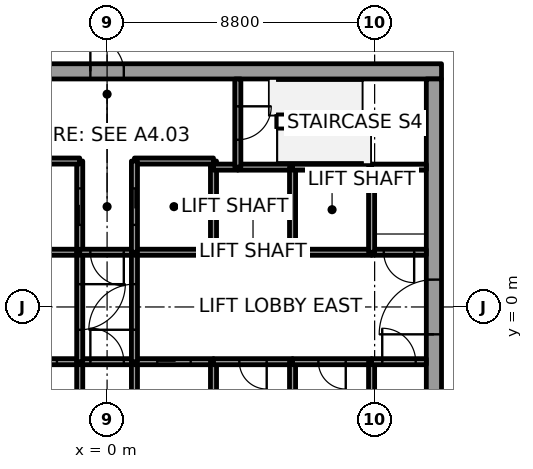
"""IFC4 building model, lengths in metres.
Left out: names, types, materials, properties, quantities, classifications, styles, units other than length and angle.
Written with IfcOpenShell. Run it as: python <this file> out.ifc"""

import sys

from ifc_helpers import new_model, si_unit, direction, frame, frame_2d, origin, place, context, subcontext, project, spatial, rectangle, extrude, element, fill, save


model = new_model("IFC4")
c1 = context("Model", 3, precision=1e-05, world=origin(), true_north=direction((0.0, 1.0)))
c2 = subcontext(c1, "Body", "Model", "MODEL_VIEW")
j1 = project(units=[si_unit("LENGTHUNIT", "METRE"), si_unit("PLANEANGLEUNIT", "RADIAN")], contexts=[c1])
p1 = place(None, origin())
s1 = spatial("IfcSite", under=j1, at=p1, CompositionType="ELEMENT")
p2 = place(p1, origin())
s2 = spatial("IfcBuilding", under=s1, at=p2, CompositionType="ELEMENT")
p3 = place(p2, frame((0.0, 0.0, 9.0)))
s3 = spatial("IfcBuildingStorey", under=s2, at=p3, CompositionType="ELEMENT", Elevation=9.0)
p4 = place(p3, frame((-11.0, 7.75, 0.0), z_axis=(0.0, 0.0, 1.0), x_axis=(1.0, 0.0, 0.0)))
e1 = element("IfcWall", 1, at=p4, inside=s3, PredefinedType="SHEAR", context=c2, shape_type="SweptSolid", body=[
    extrude(rectangle(XDim=22.0, YDim=0.5, at=frame_2d((11.0, 0.0))), origin(), (0.0, 0.0, 1.0), 7.8),
])
p5 = place(p4, frame((10.45, 0.0, 0.0)))
e2 = element("IfcOpeningElement", 2, at=p5, cuts=e1, PredefinedType="OPENING", context=c2, shape_type="SweptSolid", body=[
    extrude(rectangle(XDim=1.1, YDim=2.1, at=frame_2d((0.55, 1.05))), frame((0.0, 0.25, 0.0), z_axis=(0.0, -1.0, 0.0), x_axis=(1.0, 0.0, 0.0)), (0.0, 0.0, 1.0), 0.5),
])
p6 = place(p3, frame((10.75, -7.5, 0.0), z_axis=(0.0, 0.0, 1.0), x_axis=(0.0, 1.0, 0.0)))
e3 = element("IfcWall", 3, at=p6, inside=s3, PredefinedType="SHEAR", context=c2, shape_type="SweptSolid", body=[
    extrude(rectangle(XDim=15.0, YDim=0.5, at=frame_2d((7.5, 0.0))), origin(), (0.0, 0.0, 1.0), 7.8),
])
p7 = place(p6, frame((6.6, 0.0, 0.0)))
e4 = element("IfcOpeningElement", 4, at=p7, cuts=e3, PredefinedType="OPENING", context=c2, shape_type="SweptSolid", body=[
    extrude(rectangle(XDim=1.8, YDim=2.1, at=frame_2d((0.9, 1.05))), frame((0.0, 0.25, 0.0), z_axis=(0.0, -1.0, 0.0), x_axis=(1.0, 0.0, 0.0)), (0.0, 0.0, 1.0), 0.5),
])
p8 = place(p3, frame((-3.5, -1.8, 0.0), z_axis=(0.0, 0.0, 1.0), x_axis=(1.0, 0.0, 0.0)))
e5 = element("IfcWall", 5, at=p8, inside=s3, PredefinedType="SOLIDWALL", context=c2, shape_type="SweptSolid", body=[
    extrude(rectangle(XDim=2.6, YDim=0.2, at=frame_2d((1.3, 0.0))), origin(), (0.0, 0.0, 1.0), 7.55),
])
p9 = place(p8, frame((0.75, 0.0, 0.0)))
e6 = element("IfcOpeningElement", 6, at=p9, cuts=e5, PredefinedType="OPENING", context=c2, shape_type="SweptSolid", body=[
    extrude(rectangle(XDim=1.1, YDim=2.1, at=frame_2d((0.55, 1.05))), frame((0.0, 0.1, 0.0), z_axis=(0.0, -1.0, 0.0), x_axis=(1.0, 0.0, 0.0)), (0.0, 0.0, 1.0), 0.2),
])
p10 = place(p3, frame((-0.9, 1.8, 0.0), z_axis=(0.0, 0.0, 1.0), x_axis=(-1.0, 0.0, 0.0)))
e7 = element("IfcWall", 7, at=p10, inside=s3, PredefinedType="SOLIDWALL", context=c2, shape_type="SweptSolid", body=[
    extrude(rectangle(XDim=2.6, YDim=0.2, at=frame_2d((1.3, 0.0))), origin(), (0.0, 0.0, 1.0), 7.55),
])
p11 = place(p3, frame((-0.9, 1.8, 0.0), z_axis=(0.0, 0.0, 1.0), x_axis=(0.0, 1.0, 0.0)))
e8 = element("IfcWall", 8, at=p11, inside=s3, PredefinedType="SOLIDWALL", context=c2, shape_type="SweptSolid", body=[
    extrude(rectangle(XDim=3.0, YDim=0.2, at=frame_2d((1.5, 0.0))), origin(), (0.0, 0.0, 1.0), 7.55),
])
p12 = place(p11, frame((0.9, 0.0, 0.0)))
e9 = element("IfcOpeningElement", 9, at=p12, cuts=e8, PredefinedType="OPENING", context=c2, shape_type="SweptSolid", body=[
    extrude(rectangle(XDim=1.2, YDim=2.1, at=frame_2d((0.6, 1.05))), frame((0.0, 0.1, 0.0), z_axis=(0.0, -1.0, 0.0), x_axis=(1.0, 0.0, 0.0)), (0.0, 0.0, 1.0), 0.2),
])
p13 = place(p3, frame((-0.9, 4.8, 0.0), z_axis=(0.0, 0.0, 1.0), x_axis=(-1.0, 0.0, 0.0)))
e10 = element("IfcWall", 10, at=p13, inside=s3, PredefinedType="SOLIDWALL", context=c2, shape_type="SweptSolid", body=[
    extrude(rectangle(XDim=2.6, YDim=0.2, at=frame_2d((1.3, 0.0))), origin(), (0.0, 0.0, 1.0), 7.55),
])
p14 = place(p3, frame((-0.9, -4.6, 0.0), z_axis=(0.0, 0.0, 1.0), x_axis=(0.0, 1.0, 0.0)))
e11 = element("IfcWall", 11, at=p14, inside=s3, PredefinedType="SOLIDWALL", context=c2, shape_type="SweptSolid", body=[
    extrude(rectangle(XDim=2.8, YDim=0.2, at=frame_2d((1.4, 0.0))), origin(), (0.0, 0.0, 1.0), 7.55),
])
p15 = place(p3, frame((-0.9, -1.8, 0.0), z_axis=(0.0, 0.0, 1.0), x_axis=(1.0, 0.0, 0.0)))
e12 = element("IfcWall", 12, at=p15, inside=s3, PredefinedType="SOLIDWALL", context=c2, shape_type="SweptSolid", body=[
    extrude(rectangle(XDim=1.8, YDim=0.2, at=frame_2d((0.9, 0.0))), origin(), (0.0, 0.0, 1.0), 7.55),
])
p16 = place(p15, frame((0.35, 0.0, 0.0)))
e13 = element("IfcOpeningElement", 13, at=p16, cuts=e12, PredefinedType="OPENING", context=c2, shape_type="SweptSolid", body=[
    extrude(rectangle(XDim=1.1, YDim=2.4, at=frame_2d((0.55, 1.2))), frame((0.0, 0.1, 0.0), z_axis=(0.0, -1.0, 0.0), x_axis=(1.0, 0.0, 0.0)), (0.0, 0.0, 1.0), 0.2),
])
p17 = place(p3, frame((-0.9, 1.8, 0.0), z_axis=(0.0, 0.0, 1.0), x_axis=(0.0, -1.0, 0.0)))
e14 = element("IfcWall", 14, at=p17, inside=s3, PredefinedType="SOLIDWALL", context=c2, shape_type="SweptSolid", body=[
    extrude(rectangle(XDim=3.6, YDim=0.2, at=frame_2d((1.8, 0.0))), origin(), (0.0, 0.0, 1.0), 7.55),
])
p18 = place(p17, frame((1.05, 0.0, 0.0)))
e15 = element("IfcOpeningElement", 15, at=p18, cuts=e14, PredefinedType="OPENING", context=c2, shape_type="SweptSolid", body=[
    extrude(rectangle(XDim=1.5, YDim=2.4, at=frame_2d((0.75, 1.2))), frame((0.0, 0.1, 0.0), z_axis=(0.0, -1.0, 0.0), x_axis=(1.0, 0.0, 0.0)), (0.0, 0.0, 1.0), 0.2),
])
p19 = place(p3, frame((0.9, 1.8, 0.0), z_axis=(0.0, 0.0, 1.0), x_axis=(-1.0, 0.0, 0.0)))
e16 = element("IfcWall", 16, at=p19, inside=s3, PredefinedType="SOLIDWALL", context=c2, shape_type="SweptSolid", body=[
    extrude(rectangle(XDim=1.8, YDim=0.2, at=frame_2d((0.9, 0.0))), origin(), (0.0, 0.0, 1.0), 7.55),
])
p20 = place(p19, frame((0.35, 0.0, 0.0)))
e17 = element("IfcOpeningElement", 17, at=p20, cuts=e16, PredefinedType="OPENING", context=c2, shape_type="SweptSolid", body=[
    extrude(rectangle(XDim=1.1, YDim=2.4, at=frame_2d((0.55, 1.2))), frame((0.0, 0.1, 0.0), z_axis=(0.0, -1.0, 0.0), x_axis=(1.0, 0.0, 0.0)), (0.0, 0.0, 1.0), 0.2),
])
p21 = place(p3, frame((0.9, -1.8, 0.0), z_axis=(0.0, 0.0, 1.0), x_axis=(0.0, -1.0, 0.0)))
e18 = element("IfcWall", 18, at=p21, inside=s3, PredefinedType="SOLIDWALL", context=c2, shape_type="SweptSolid", body=[
    extrude(rectangle(XDim=2.8, YDim=0.2, at=frame_2d((1.4, 0.0))), origin(), (0.0, 0.0, 1.0), 7.55),
])
p22 = place(p3, frame((0.9, -1.8, 0.0), z_axis=(0.0, 0.0, 1.0), x_axis=(1.0, 0.0, 0.0)))
e19 = element("IfcWall", 19, at=p22, inside=s3, PredefinedType="SOLIDWALL", context=c2, shape_type="SweptSolid", body=[
    extrude(rectangle(XDim=2.6, YDim=0.2, at=frame_2d((1.3, 0.0))), origin(), (0.0, 0.0, 1.0), 7.55),
])
p23 = place(p22, frame((0.75, 0.0, 0.0)))
e20 = element("IfcOpeningElement", 20, at=p23, cuts=e19, PredefinedType="OPENING", context=c2, shape_type="SweptSolid", body=[
    extrude(rectangle(XDim=1.1, YDim=2.1, at=frame_2d((0.55, 1.05))), frame((0.0, 0.1, 0.0), z_axis=(0.0, -1.0, 0.0), x_axis=(1.0, 0.0, 0.0)), (0.0, 0.0, 1.0), 0.2),
])
p24 = place(p3, frame((0.9, -1.8, 0.0), z_axis=(0.0, 0.0, 1.0), x_axis=(0.0, 1.0, 0.0)))
e21 = element("IfcWall", 21, at=p24, inside=s3, PredefinedType="SOLIDWALL", context=c2, shape_type="SweptSolid", body=[
    extrude(rectangle(XDim=3.6, YDim=0.2, at=frame_2d((1.8, 0.0))), origin(), (0.0, 0.0, 1.0), 7.55),
])
p25 = place(p24, frame((1.05, 0.0, 0.0)))
e22 = element("IfcOpeningElement", 22, at=p25, cuts=e21, PredefinedType="OPENING", context=c2, shape_type="SweptSolid", body=[
    extrude(rectangle(XDim=1.5, YDim=2.4, at=frame_2d((0.75, 1.2))), frame((0.0, 0.1, 0.0), z_axis=(0.0, -1.0, 0.0), x_axis=(1.0, 0.0, 0.0)), (0.0, 0.0, 1.0), 0.2),
])
p26 = place(p3, frame((3.5, 1.8, 0.0), z_axis=(0.0, 0.0, 1.0), x_axis=(-1.0, 0.0, 0.0)))
e23 = element("IfcWall", 23, at=p26, inside=s3, PredefinedType="SOLIDWALL", context=c2, shape_type="SweptSolid", body=[
    extrude(rectangle(XDim=2.6, YDim=0.2, at=frame_2d((1.3, 0.0))), origin(), (0.0, 0.0, 1.0), 7.55),
])
p27 = place(p3, frame((3.5, 4.6, 0.0), z_axis=(0.0, 0.0, 1.0), x_axis=(0.0, 1.0, 0.0)))
e24 = element("IfcWall", 24, at=p27, inside=s3, PredefinedType="SOLIDWALL", context=c2, shape_type="SweptSolid", body=[
    extrude(rectangle(XDim=0.2, YDim=0.2, at=frame_2d((0.1, 0.0))), origin(), (0.0, 0.0, 1.0), 7.55),
])
p28 = place(p3, frame((3.5, 4.8, 0.0), z_axis=(0.0, 0.0, 1.0), x_axis=(-1.0, 0.0, 0.0)))
e25 = element("IfcWall", 25, at=p28, inside=s3, PredefinedType="SOLIDWALL", context=c2, shape_type="SweptSolid", body=[
    extrude(rectangle(XDim=2.6, YDim=0.2, at=frame_2d((1.3, 0.0))), origin(), (0.0, 0.0, 1.0), 7.55),
])
p29 = place(p3, frame((0.9, 4.8, 0.0), z_axis=(0.0, 0.0, 1.0), x_axis=(0.0, -1.0, 0.0)))
e26 = element("IfcWall", 26, at=p29, inside=s3, PredefinedType="SOLIDWALL", context=c2, shape_type="SweptSolid", body=[
    extrude(rectangle(XDim=3.0, YDim=0.2, at=frame_2d((1.5, 0.0))), origin(), (0.0, 0.0, 1.0), 7.55),
])
p30 = place(p29, frame((0.9, 0.0, 0.0)))
e27 = element("IfcOpeningElement", 27, at=p30, cuts=e26, PredefinedType="OPENING", context=c2, shape_type="SweptSolid", body=[
    extrude(rectangle(XDim=1.2, YDim=2.1, at=frame_2d((0.6, 1.05))), frame((0.0, 0.1, 0.0), z_axis=(0.0, -1.0, 0.0), x_axis=(1.0, 0.0, 0.0)), (0.0, 0.0, 1.0), 0.2),
])
p31 = place(p3, frame((3.5, -1.8, 0.0), z_axis=(0.0, 0.0, 1.0), x_axis=(0.0, -1.0, 0.0)))
e28 = element("IfcWall", 28, at=p31, inside=s3, PredefinedType="SOLIDWALL", context=c2, shape_type="SweptSolid", body=[
    extrude(rectangle(XDim=2.8, YDim=0.2, at=frame_2d((1.4, 0.0))), origin(), (0.0, 0.0, 1.0), 7.55),
])
p32 = place(p3, frame((6.1, -1.8, 0.0), z_axis=(0.0, 0.0, 1.0), x_axis=(-1.0, 0.0, 0.0)))
e29 = element("IfcWall", 29, at=p32, inside=s3, PredefinedType="SOLIDWALL", context=c2, shape_type="SweptSolid", body=[
    extrude(rectangle(XDim=2.6, YDim=0.2, at=frame_2d((1.3, 0.0))), origin(), (0.0, 0.0, 1.0), 7.55),
])
p33 = place(p32, frame((0.85, 0.0, 0.0)))
e30 = element("IfcOpeningElement", 30, at=p33, cuts=e29, PredefinedType="OPENING", context=c2, shape_type="SweptSolid", body=[
    extrude(rectangle(XDim=0.9, YDim=2.4, at=frame_2d((0.45, 1.2))), frame((0.0, 0.1, 0.0), z_axis=(0.0, -1.0, 0.0), x_axis=(1.0, 0.0, 0.0)), (0.0, 0.0, 1.0), 0.2),
])
p34 = place(p3, frame((6.1, 1.8, 0.0), z_axis=(0.0, 0.0, 1.0), x_axis=(-1.0, 0.0, 0.0)))
e31 = element("IfcWall", 31, at=p34, inside=s3, PredefinedType="SOLIDWALL", context=c2, shape_type="SweptSolid", body=[
    extrude(rectangle(XDim=2.6, YDim=0.2, at=frame_2d((1.3, 0.0))), origin(), (0.0, 0.0, 1.0), 7.55),
])
p35 = place(p3, frame((3.5, 1.8, 0.0), z_axis=(0.0, 0.0, 1.0), x_axis=(0.0, 1.0, 0.0)))
e32 = element("IfcWall", 32, at=p35, inside=s3, PredefinedType="SOLIDWALL", context=c2, shape_type="SweptSolid", body=[
    extrude(rectangle(XDim=2.8, YDim=0.2, at=frame_2d((1.4, 0.0))), origin(), (0.0, 0.0, 1.0), 7.55),
])
p36 = place(p3, frame((4.3, 4.6, 0.0), z_axis=(0.0, 0.0, 1.0), x_axis=(-1.0, 0.0, 0.0)))
e33 = element("IfcWall", 33, at=p36, inside=s3, PredefinedType="SOLIDWALL", context=c2, shape_type="SweptSolid", body=[
    extrude(rectangle(XDim=0.8, YDim=0.2, at=frame_2d((0.4, 0.0))), origin(), (0.0, 0.0, 1.0), 7.55),
])
p37 = place(p3, frame((6.1, 4.6, 0.0), z_axis=(0.0, 0.0, 1.0), x_axis=(-1.0, 0.0, 0.0)))
e34 = element("IfcWall", 34, at=p37, inside=s3, PredefinedType="SOLIDWALL", context=c2, shape_type="SweptSolid", body=[
    extrude(rectangle(XDim=1.8, YDim=0.2, at=frame_2d((0.9, 0.0))), origin(), (0.0, 0.0, 1.0), 7.55),
])
p38 = place(p3, frame((4.3, 7.5, 0.0), z_axis=(0.0, 0.0, 1.0), x_axis=(0.0, -1.0, 0.0)))
e35 = element("IfcWall", 35, at=p38, inside=s3, PredefinedType="SOLIDWALL", context=c2, shape_type="SweptSolid", body=[
    extrude(rectangle(XDim=2.9, YDim=0.2, at=frame_2d((1.45, 0.0))), origin(), (0.0, 0.0, 1.0), 7.55),
])
p39 = place(p38, frame((0.9, 0.0, 0.0)))
e36 = element("IfcOpeningElement", 36, at=p39, cuts=e35, PredefinedType="OPENING", context=c2, shape_type="SweptSolid", body=[
    extrude(rectangle(XDim=1.1, YDim=2.4, at=frame_2d((0.55, 1.2))), frame((0.0, 0.1, 0.0), z_axis=(0.0, -1.0, 0.0), x_axis=(1.0, 0.0, 0.0)), (0.0, 0.0, 1.0), 0.2),
])
p40 = place(p3, frame((6.1, -4.6, 0.0), z_axis=(0.0, 0.0, 1.0), x_axis=(0.0, 1.0, 0.0)))
e37 = element("IfcWall", 37, at=p40, inside=s3, PredefinedType="SOLIDWALL", context=c2, shape_type="SweptSolid", body=[
    extrude(rectangle(XDim=2.8, YDim=0.2, at=frame_2d((1.4, 0.0))), origin(), (0.0, 0.0, 1.0), 7.55),
])
p41 = place(p3, frame((8.7, -1.8, 0.0), z_axis=(0.0, 0.0, 1.0), x_axis=(-1.0, 0.0, 0.0)))
e38 = element("IfcWall", 38, at=p41, inside=s3, PredefinedType="SOLIDWALL", context=c2, shape_type="SweptSolid", body=[
    extrude(rectangle(XDim=2.6, YDim=0.2, at=frame_2d((1.3, 0.0))), origin(), (0.0, 0.0, 1.0), 7.55),
])
p42 = place(p41, frame((0.85, 0.0, 0.0)))
e39 = element("IfcOpeningElement", 39, at=p42, cuts=e38, PredefinedType="OPENING", context=c2, shape_type="SweptSolid", body=[
    extrude(rectangle(XDim=0.9, YDim=2.4, at=frame_2d((0.45, 1.2))), frame((0.0, 0.1, 0.0), z_axis=(0.0, -1.0, 0.0), x_axis=(1.0, 0.0, 0.0)), (0.0, 0.0, 1.0), 0.2),
])
p43 = place(p3, frame((8.7, 1.8, 0.0), z_axis=(0.0, 0.0, 1.0), x_axis=(-1.0, 0.0, 0.0)))
e40 = element("IfcWall", 40, at=p43, inside=s3, PredefinedType="SOLIDWALL", context=c2, shape_type="SweptSolid", body=[
    extrude(rectangle(XDim=2.6, YDim=0.2, at=frame_2d((1.3, 0.0))), origin(), (0.0, 0.0, 1.0), 7.55),
])
p44 = place(p3, frame((6.1, 1.8, 0.0), z_axis=(0.0, 0.0, 1.0), x_axis=(0.0, 1.0, 0.0)))
e41 = element("IfcWall", 41, at=p44, inside=s3, PredefinedType="SOLIDWALL", context=c2, shape_type="SweptSolid", body=[
    extrude(rectangle(XDim=2.8, YDim=0.2, at=frame_2d((1.4, 0.0))), origin(), (0.0, 0.0, 1.0), 7.55),
])
p45 = place(p3, frame((8.7, 4.6, 0.0), z_axis=(0.0, 0.0, 1.0), x_axis=(-1.0, 0.0, 0.0)))
e42 = element("IfcWall", 42, at=p45, inside=s3, PredefinedType="SOLIDWALL", context=c2, shape_type="SweptSolid", body=[
    extrude(rectangle(XDim=2.6, YDim=0.2, at=frame_2d((1.3, 0.0))), origin(), (0.0, 0.0, 1.0), 7.55),
])
p46 = place(p3, frame((8.7, -4.6, 0.0), z_axis=(0.0, 0.0, 1.0), x_axis=(0.0, 1.0, 0.0)))
e43 = element("IfcWall", 43, at=p46, inside=s3, PredefinedType="SOLIDWALL", context=c2, shape_type="SweptSolid", body=[
    extrude(rectangle(XDim=2.8, YDim=0.2, at=frame_2d((1.4, 0.0))), origin(), (0.0, 0.0, 1.0), 7.55),
])
p47 = place(p3, frame((8.7, -1.8, 0.0), z_axis=(0.0, 0.0, 1.0), x_axis=(1.0, 0.0, 0.0)))
e44 = element("IfcWall", 44, at=p47, inside=s3, PredefinedType="SOLIDWALL", context=c2, shape_type="SweptSolid", body=[
    extrude(rectangle(XDim=1.8, YDim=0.2, at=frame_2d((0.9, 0.0))), origin(), (0.0, 0.0, 1.0), 7.55),
])
p48 = place(p47, frame((0.35, 0.0, 0.0)))
e45 = element("IfcOpeningElement", 45, at=p48, cuts=e44, PredefinedType="OPENING", context=c2, shape_type="SweptSolid", body=[
    extrude(rectangle(XDim=1.1, YDim=2.4, at=frame_2d((0.55, 1.2))), frame((0.0, 0.1, 0.0), z_axis=(0.0, -1.0, 0.0), x_axis=(1.0, 0.0, 0.0)), (0.0, 0.0, 1.0), 0.2),
])
p49 = place(p3, frame((10.5, 1.8, 0.0), z_axis=(0.0, 0.0, 1.0), x_axis=(-1.0, 0.0, 0.0)))
e46 = element("IfcWall", 46, at=p49, inside=s3, PredefinedType="SOLIDWALL", context=c2, shape_type="SweptSolid", body=[
    extrude(rectangle(XDim=1.8, YDim=0.2, at=frame_2d((0.9, 0.0))), origin(), (0.0, 0.0, 1.0), 7.55),
])
p50 = place(p49, frame((0.4, 0.0, 0.0)))
e47 = element("IfcOpeningElement", 47, at=p50, cuts=e46, PredefinedType="OPENING", context=c2, shape_type="SweptSolid", body=[
    extrude(rectangle(XDim=1.0, YDim=2.4, at=frame_2d((0.5, 1.2))), frame((0.0, 0.1, 0.0), z_axis=(0.0, -1.0, 0.0), x_axis=(1.0, 0.0, 0.0)), (0.0, 0.0, 1.0), 0.2),
])
p51 = place(p3, frame((8.7, 4.6, 0.0), z_axis=(0.0, 0.0, 1.0), x_axis=(0.0, -1.0, 0.0)))
e48 = element("IfcWall", 48, at=p51, inside=s3, PredefinedType="SOLIDWALL", context=c2, shape_type="SweptSolid", body=[
    extrude(rectangle(XDim=2.8, YDim=0.2, at=frame_2d((1.4, 0.0))), origin(), (0.0, 0.0, 1.0), 7.55),
])
p52 = place(p3, frame((10.5, 4.6, 0.0), z_axis=(0.0, 0.0, 1.0), x_axis=(-1.0, 0.0, 0.0)))
e49 = element("IfcWall", 49, at=p52, inside=s3, PredefinedType="SOLIDWALL", context=c2, shape_type="SweptSolid", body=[
    extrude(rectangle(XDim=1.8, YDim=0.2, at=frame_2d((0.9, 0.0))), origin(), (0.0, 0.0, 1.0), 7.55),
])
p53 = place(p9, origin())
e50 = element("IfcDoor", 50, at=p53, inside=s3, OperationType="SLIDING_TO_RIGHT", PredefinedType="DOOR", context=c2, shape_type="SweptSolid", body=[
    extrude(rectangle(XDim=1.1, YDim=2.1, at=frame_2d((0.55, 1.05))), frame((0.0, 0.025, 0.0), z_axis=(0.0, -1.0, 0.0), x_axis=(1.0, 0.0, 0.0)), (0.0, 0.0, 1.0), 0.05),
])
fill(e6, e50)
p54 = place(p23, origin())
e51 = element("IfcDoor", 51, at=p54, inside=s3, OperationType="SLIDING_TO_LEFT", PredefinedType="DOOR", context=c2, shape_type="SweptSolid", body=[
    extrude(rectangle(XDim=1.1, YDim=2.1, at=frame_2d((0.55, 1.05))), frame((0.0, 0.025, 0.0), z_axis=(0.0, -1.0, 0.0), x_axis=(1.0, 0.0, 0.0)), (0.0, 0.0, 1.0), 0.05),
])
fill(e20, e51)
p55 = place(p12, origin())
e52 = element("IfcDoor", 52, at=p55, inside=s3, OperationType="SLIDING_TO_LEFT", PredefinedType="DOOR", context=c2, shape_type="SweptSolid", body=[
    extrude(rectangle(XDim=1.2, YDim=2.1, at=frame_2d((0.6, 1.05))), frame((0.0, 0.025, 0.0), z_axis=(0.0, -1.0, 0.0), x_axis=(1.0, 0.0, 0.0)), (0.0, 0.0, 1.0), 0.05),
])
fill(e9, e52)
p56 = place(p30, origin())
e53 = element("IfcDoor", 53, at=p56, inside=s3, OperationType="SLIDING_TO_LEFT", PredefinedType="DOOR", context=c2, shape_type="SweptSolid", body=[
    extrude(rectangle(XDim=1.2, YDim=2.1, at=frame_2d((0.6, 1.05))), frame((0.0, 0.025, 0.0), z_axis=(0.0, -1.0, 0.0), x_axis=(1.0, 0.0, 0.0)), (0.0, 0.0, 1.0), 0.05),
])
fill(e27, e53)
p57 = place(p18, origin())
e54 = element("IfcDoor", 54, at=p57, inside=s3, OperationType="DOUBLE_DOOR_SINGLE_SWING", PredefinedType="DOOR", context=c2, shape_type="SweptSolid", body=[
    extrude(rectangle(XDim=1.5, YDim=2.4, at=frame_2d((0.75, 1.2))), frame((0.0, 0.025, 0.0), z_axis=(0.0, -1.0, 0.0), x_axis=(1.0, 0.0, 0.0)), (0.0, 0.0, 1.0), 0.05),
])
fill(e15, e54)
p58 = place(p25, origin())
e55 = element("IfcDoor", 55, at=p58, inside=s3, OperationType="DOUBLE_DOOR_SINGLE_SWING", PredefinedType="DOOR", context=c2, shape_type="SweptSolid", body=[
    extrude(rectangle(XDim=1.5, YDim=2.4, at=frame_2d((0.75, 1.2))), frame((0.0, 0.025, 0.0), z_axis=(0.0, -1.0, 0.0), x_axis=(1.0, 0.0, 0.0)), (0.0, 0.0, 1.0), 0.05),
])
fill(e22, e55)
p59 = place(p48, origin())
e56 = element("IfcDoor", 56, at=p59, inside=s3, OperationType="SINGLE_SWING_RIGHT", PredefinedType="DOOR", context=c2, shape_type="SweptSolid", body=[
    extrude(rectangle(XDim=1.1, YDim=2.4, at=frame_2d((0.55, 1.2))), frame((0.0, 0.025, 0.0), z_axis=(0.0, -1.0, 0.0), x_axis=(1.0, 0.0, 0.0)), (0.0, 0.0, 1.0), 0.05),
])
fill(e45, e56)
p60 = place(p20, origin())
e57 = element("IfcDoor", 57, at=p60, inside=s3, OperationType="SINGLE_SWING_RIGHT", PredefinedType="DOOR", context=c2, shape_type="SweptSolid", body=[
    extrude(rectangle(XDim=1.1, YDim=2.4, at=frame_2d((0.55, 1.2))), frame((0.0, 0.025, 0.0), z_axis=(0.0, -1.0, 0.0), x_axis=(1.0, 0.0, 0.0)), (0.0, 0.0, 1.0), 0.05),
])
fill(e17, e57)
p61 = place(p16, origin())
e58 = element("IfcDoor", 58, at=p61, inside=s3, OperationType="SINGLE_SWING_RIGHT", PredefinedType="DOOR", context=c2, shape_type="SweptSolid", body=[
    extrude(rectangle(XDim=1.1, YDim=2.4, at=frame_2d((0.55, 1.2))), frame((0.0, 0.025, 0.0), z_axis=(0.0, -1.0, 0.0), x_axis=(1.0, 0.0, 0.0)), (0.0, 0.0, 1.0), 0.05),
])
fill(e13, e58)
p62 = place(p50, origin())
e59 = element("IfcDoor", 59, at=p62, inside=s3, OperationType="SINGLE_SWING_RIGHT", PredefinedType="DOOR", context=c2, shape_type="SweptSolid", body=[
    extrude(rectangle(XDim=1.0, YDim=2.4, at=frame_2d((0.5, 1.2))), frame((0.0, 0.025, 0.0), z_axis=(0.0, -1.0, 0.0), x_axis=(1.0, 0.0, 0.0)), (0.0, 0.0, 1.0), 0.05),
])
fill(e47, e59)
p63 = place(p39, origin())
e60 = element("IfcDoor", 60, at=p63, inside=s3, OperationType="SINGLE_SWING_RIGHT", PredefinedType="DOOR", context=c2, shape_type="SweptSolid", body=[
    extrude(rectangle(XDim=1.1, YDim=2.4, at=frame_2d((0.55, 1.2))), frame((0.0, 0.025, 0.0), z_axis=(0.0, -1.0, 0.0), x_axis=(1.0, 0.0, 0.0)), (0.0, 0.0, 1.0), 0.05),
])
fill(e36, e60)
p64 = place(p33, origin())
e61 = element("IfcDoor", 61, at=p64, inside=s3, OperationType="SINGLE_SWING_LEFT", PredefinedType="DOOR", context=c2, shape_type="SweptSolid", body=[
    extrude(rectangle(XDim=0.9, YDim=2.4, at=frame_2d((0.45, 1.2))), frame((0.0, 0.025, 0.0), z_axis=(0.0, -1.0, 0.0), x_axis=(1.0, 0.0, 0.0)), (0.0, 0.0, 1.0), 0.05),
])
fill(e30, e61)
p65 = place(p42, origin())
e62 = element("IfcDoor", 62, at=p65, inside=s3, OperationType="SINGLE_SWING_RIGHT", PredefinedType="DOOR", context=c2, shape_type="SweptSolid", body=[
    extrude(rectangle(XDim=0.9, YDim=2.4, at=frame_2d((0.45, 1.2))), frame((0.0, 0.025, 0.0), z_axis=(0.0, -1.0, 0.0), x_axis=(1.0, 0.0, 0.0)), (0.0, 0.0, 1.0), 0.05),
])
fill(e39, e62)
p66 = place(p7, origin())
e63 = element("IfcDoor", 63, at=p66, inside=s3, OperationType="DOUBLE_DOOR_SINGLE_SWING", PredefinedType="DOOR", context=c2, shape_type="SweptSolid", body=[
    extrude(rectangle(XDim=1.8, YDim=2.1, at=frame_2d((0.9, 1.05))), frame((0.0, 0.025, 0.0), z_axis=(0.0, -1.0, 0.0), x_axis=(1.0, 0.0, 0.0)), (0.0, 0.0, 1.0), 0.05),
])
fill(e4, e63)
p67 = place(p5, origin())
e64 = element("IfcDoor", 64, at=p67, inside=s3, OperationType="SINGLE_SWING_RIGHT", PredefinedType="DOOR", context=c2, shape_type="SweptSolid", body=[
    extrude(rectangle(XDim=1.1, YDim=2.1, at=frame_2d((0.55, 1.05))), frame((0.0, 0.025, 0.0), z_axis=(0.0, -1.0, 0.0), x_axis=(1.0, 0.0, 0.0)), (0.0, 0.0, 1.0), 0.05),
])
fill(e2, e64)
save(model, sys.argv[1])
